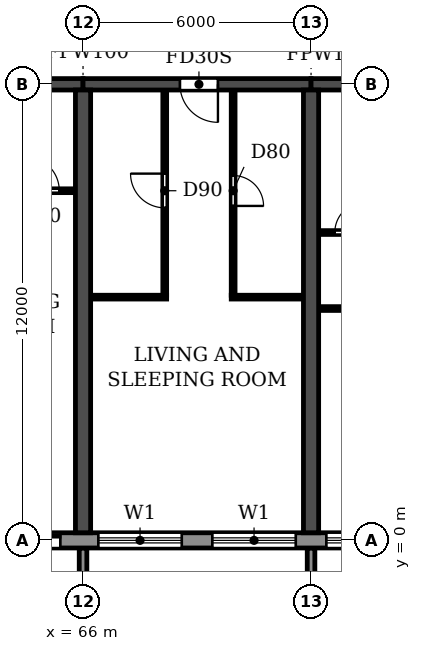
"""IFC4 building model, lengths in metres.
Left out: names, types, materials, properties, quantities, classifications, styles, units other than length and angle.
Written with IfcOpenShell. Run it as: python <this file> out.ifc"""

import sys

from ifc_helpers import new_model, si_unit, direction, frame, frame_2d, origin, place, context, subcontext, project, spatial, polyline, rectangle, outline, extrude, source, transform, mapped, element, fill, save


model = new_model("IFC4")
c1 = context("Model", 3, precision=1e-05, world=origin(), true_north=direction((0.0, 1.0)))
c2 = subcontext(c1, "Body", "Model", "MODEL_VIEW")
j1 = project(units=[si_unit("LENGTHUNIT", "METRE"), si_unit("PLANEANGLEUNIT", "RADIAN")], contexts=[c1])
p1 = place(None, origin())
s1 = spatial("IfcSite", under=j1, at=p1, CompositionType="ELEMENT")
p2 = place(p1, origin())
s2 = spatial("IfcBuilding", under=s1, at=p2, CompositionType="ELEMENT")
p3 = place(p2, frame((0.0, 0.0, 49.8)))
s3 = spatial("IfcBuildingStorey", under=s2, at=p3, CompositionType="ELEMENT", Elevation=49.8)
for number, where, z_axis, x_axis in (
    (1, (66.0, 0.2, 0.0), (0.0, 0.0, 1.0), (0.0, 1.0, 0.0)),
    (2, (72.0, 0.2, 0.0), (0.0, 0.0, 1.0), (0.0, 1.0, 0.0)),
):
    element("IfcWall", number, at=place(p3, frame(where, z_axis=z_axis, x_axis=x_axis)), inside=s3, PredefinedType="SHEAR", context=c2, shape_type="SweptSolid", body=[
        extrude(rectangle(XDim=11.65, YDim=0.4, at=frame_2d((5.825, 0.0))), origin(), (0.0, 0.0, 1.0), 3.0),
    ])
p4 = place(p3, frame((60.0, 12.0, 0.0), z_axis=(0.0, 0.0, 1.0), x_axis=(1.0, 0.0, 0.0)))
e3 = element("IfcWall", 3, at=p4, inside=s3, PredefinedType="SHEAR", context=c2, shape_type="SweptSolid", body=[
    extrude(rectangle(XDim=6.0, YDim=0.3, at=frame_2d((3.0, 0.0))), origin(), (0.0, 0.0, 1.0), 2.4),
])
p5 = place(p4, frame((2.45, 0.0, 0.0)))
e4 = element("IfcOpeningElement", 4, at=p5, cuts=e3, PredefinedType="OPENING", context=c2, shape_type="SweptSolid", body=[
    extrude(rectangle(XDim=1.0, YDim=2.1, at=frame_2d((0.5, 1.05))), frame((0.0, 0.16, 0.0), z_axis=(0.0, -1.0, 0.0), x_axis=(1.0, 0.0, 0.0)), (0.0, 0.0, 1.0), 0.32),
])
p6 = place(p3, frame((66.0, 12.0, 0.0), z_axis=(0.0, 0.0, 1.0), x_axis=(1.0, 0.0, 0.0)))
e5 = element("IfcWall", 5, at=p6, inside=s3, PredefinedType="SHEAR", context=c2, shape_type="SweptSolid", body=[
    extrude(rectangle(XDim=6.0, YDim=0.3, at=frame_2d((3.0, 0.0))), origin(), (0.0, 0.0, 1.0), 2.4),
])
p7 = place(p6, frame((2.55, 0.0, 0.0)))
e6 = element("IfcOpeningElement", 6, at=p7, cuts=e5, PredefinedType="OPENING", context=c2, shape_type="SweptSolid", body=[
    extrude(rectangle(XDim=1.0, YDim=2.1, at=frame_2d((0.5, 1.05))), frame((0.0, 0.16, 0.0), z_axis=(0.0, -1.0, 0.0), x_axis=(1.0, 0.0, 0.0)), (0.0, 0.0, 1.0), 0.32),
])
p8 = place(p3, frame((72.0, 12.0, 0.0), z_axis=(0.0, 0.0, 1.0), x_axis=(1.0, 0.0, 0.0)))
e7 = element("IfcWall", 7, at=p8, inside=s3, PredefinedType="SHEAR", context=c2, shape_type="SweptSolid", body=[
    extrude(rectangle(XDim=6.0, YDim=0.3, at=frame_2d((3.0, 0.0))), origin(), (0.0, 0.0, 1.0), 2.4),
])
p9 = place(p8, frame((2.45, 0.0, 0.0)))
e8 = element("IfcOpeningElement", 8, at=p9, cuts=e7, PredefinedType="OPENING", context=c2, shape_type="SweptSolid", body=[
    extrude(rectangle(XDim=1.0, YDim=2.1, at=frame_2d((0.5, 1.05))), frame((0.0, 0.16, 0.0), z_axis=(0.0, -1.0, 0.0), x_axis=(1.0, 0.0, 0.0)), (0.0, 0.0, 1.0), 0.32),
])
p10 = place(p3, frame((4.683, 0.0, 0.0), z_axis=(0.0, 0.0, 1.0), x_axis=(1.0, 0.0, 0.0)))
e9 = element("IfcWall", 9, at=p10, inside=s3, PredefinedType="STANDARD", context=c2, shape_type="SweptSolid", body=[
    extrude(rectangle(XDim=92.634, YDim=0.4, at=frame_2d((46.317, 0.0))), origin(), (0.0, 0.0, 1.0), 3.0),
])
p11 = place(p10, frame((1.717, 0.0, 0.9)))
e10 = element("IfcOpeningElement", 10, at=p11, cuts=e9, PredefinedType="OPENING", context=c2, shape_type="SweptSolid", body=[
    extrude(rectangle(XDim=2.2, YDim=1.5, at=frame_2d((1.1, 0.75))), frame((0.0, 0.21, 0.0), z_axis=(0.0, -1.0, 0.0), x_axis=(1.0, 0.0, 0.0)), (0.0, 0.0, 1.0), 0.42),
])
p12 = place(p10, frame((4.717, 0.0, 0.9)))
e11 = element("IfcOpeningElement", 11, at=p12, cuts=e9, PredefinedType="OPENING", context=c2, shape_type="SweptSolid", body=[
    extrude(rectangle(XDim=2.2, YDim=1.5, at=frame_2d((1.1, 0.75))), frame((0.0, 0.21, 0.0), z_axis=(0.0, -1.0, 0.0), x_axis=(1.0, 0.0, 0.0)), (0.0, 0.0, 1.0), 0.42),
])
p13 = place(p10, frame((7.717, 0.0, 0.9)))
e12 = element("IfcOpeningElement", 12, at=p13, cuts=e9, PredefinedType="OPENING", context=c2, shape_type="SweptSolid", body=[
    extrude(rectangle(XDim=2.2, YDim=1.5, at=frame_2d((1.1, 0.75))), frame((0.0, 0.21, 0.0), z_axis=(0.0, -1.0, 0.0), x_axis=(1.0, 0.0, 0.0)), (0.0, 0.0, 1.0), 0.42),
])
p14 = place(p10, frame((10.917, 0.0, 0.0)))
e13 = element("IfcOpeningElement", 13, at=p14, cuts=e9, PredefinedType="OPENING", context=c2, shape_type="SweptSolid", body=[
    extrude(rectangle(XDim=1.8, YDim=2.4, at=frame_2d((0.9, 1.2))), frame((0.0, 0.21, 0.0), z_axis=(0.0, -1.0, 0.0), x_axis=(1.0, 0.0, 0.0)), (0.0, 0.0, 1.0), 0.42),
])
p15 = place(p10, frame((13.717, 0.0, 0.9)))
e14 = element("IfcOpeningElement", 14, at=p15, cuts=e9, PredefinedType="OPENING", context=c2, shape_type="SweptSolid", body=[
    extrude(rectangle(XDim=2.2, YDim=1.5, at=frame_2d((1.1, 0.75))), frame((0.0, 0.21, 0.0), z_axis=(0.0, -1.0, 0.0), x_axis=(1.0, 0.0, 0.0)), (0.0, 0.0, 1.0), 0.42),
])
p16 = place(p10, frame((16.717, 0.0, 0.9)))
e15 = element("IfcOpeningElement", 15, at=p16, cuts=e9, PredefinedType="OPENING", context=c2, shape_type="SweptSolid", body=[
    extrude(rectangle(XDim=2.2, YDim=1.5, at=frame_2d((1.1, 0.75))), frame((0.0, 0.21, 0.0), z_axis=(0.0, -1.0, 0.0), x_axis=(1.0, 0.0, 0.0)), (0.0, 0.0, 1.0), 0.42),
])
p17 = place(p10, frame((19.917, 0.0, 0.0)))
e16 = element("IfcOpeningElement", 16, at=p17, cuts=e9, PredefinedType="OPENING", context=c2, shape_type="SweptSolid", body=[
    extrude(rectangle(XDim=1.8, YDim=2.4, at=frame_2d((0.9, 1.2))), frame((0.0, 0.21, 0.0), z_axis=(0.0, -1.0, 0.0), x_axis=(1.0, 0.0, 0.0)), (0.0, 0.0, 1.0), 0.42),
])
p18 = place(p10, frame((22.717, 0.0, 0.9)))
e17 = element("IfcOpeningElement", 17, at=p18, cuts=e9, PredefinedType="OPENING", context=c2, shape_type="SweptSolid", body=[
    extrude(rectangle(XDim=2.2, YDim=1.5, at=frame_2d((1.1, 0.75))), frame((0.0, 0.21, 0.0), z_axis=(0.0, -1.0, 0.0), x_axis=(1.0, 0.0, 0.0)), (0.0, 0.0, 1.0), 0.42),
])
p19 = place(p10, frame((25.717, 0.0, 0.9)))
e18 = element("IfcOpeningElement", 18, at=p19, cuts=e9, PredefinedType="OPENING", context=c2, shape_type="SweptSolid", body=[
    extrude(rectangle(XDim=2.2, YDim=1.5, at=frame_2d((1.1, 0.75))), frame((0.0, 0.21, 0.0), z_axis=(0.0, -1.0, 0.0), x_axis=(1.0, 0.0, 0.0)), (0.0, 0.0, 1.0), 0.42),
])
p20 = place(p10, frame((28.717, 0.0, 0.9)))
e19 = element("IfcOpeningElement", 19, at=p20, cuts=e9, PredefinedType="OPENING", context=c2, shape_type="SweptSolid", body=[
    extrude(rectangle(XDim=2.2, YDim=1.5, at=frame_2d((1.1, 0.75))), frame((0.0, 0.21, 0.0), z_axis=(0.0, -1.0, 0.0), x_axis=(1.0, 0.0, 0.0)), (0.0, 0.0, 1.0), 0.42),
])
p21 = place(p10, frame((31.717, 0.0, 0.9)))
e20 = element("IfcOpeningElement", 20, at=p21, cuts=e9, PredefinedType="OPENING", context=c2, shape_type="SweptSolid", body=[
    extrude(rectangle(XDim=2.2, YDim=1.5, at=frame_2d((1.1, 0.75))), frame((0.0, 0.21, 0.0), z_axis=(0.0, -1.0, 0.0), x_axis=(1.0, 0.0, 0.0)), (0.0, 0.0, 1.0), 0.42),
])
p22 = place(p10, frame((34.917, 0.0, 0.0)))
e21 = element("IfcOpeningElement", 21, at=p22, cuts=e9, PredefinedType="OPENING", context=c2, shape_type="SweptSolid", body=[
    extrude(rectangle(XDim=1.8, YDim=2.4, at=frame_2d((0.9, 1.2))), frame((0.0, 0.21, 0.0), z_axis=(0.0, -1.0, 0.0), x_axis=(1.0, 0.0, 0.0)), (0.0, 0.0, 1.0), 0.42),
])
p23 = place(p10, frame((37.717, 0.0, 0.9)))
e22 = element("IfcOpeningElement", 22, at=p23, cuts=e9, PredefinedType="OPENING", context=c2, shape_type="SweptSolid", body=[
    extrude(rectangle(XDim=2.2, YDim=1.5, at=frame_2d((1.1, 0.75))), frame((0.0, 0.21, 0.0), z_axis=(0.0, -1.0, 0.0), x_axis=(1.0, 0.0, 0.0)), (0.0, 0.0, 1.0), 0.42),
])
p24 = place(p10, frame((40.717, 0.0, 0.9)))
e23 = element("IfcOpeningElement", 23, at=p24, cuts=e9, PredefinedType="OPENING", context=c2, shape_type="SweptSolid", body=[
    extrude(rectangle(XDim=2.2, YDim=1.5, at=frame_2d((1.1, 0.75))), frame((0.0, 0.21, 0.0), z_axis=(0.0, -1.0, 0.0), x_axis=(1.0, 0.0, 0.0)), (0.0, 0.0, 1.0), 0.42),
])
p25 = place(p10, frame((43.717, 0.0, 0.9)))
e24 = element("IfcOpeningElement", 24, at=p25, cuts=e9, PredefinedType="OPENING", context=c2, shape_type="SweptSolid", body=[
    extrude(rectangle(XDim=2.2, YDim=1.5, at=frame_2d((1.1, 0.75))), frame((0.0, 0.21, 0.0), z_axis=(0.0, -1.0, 0.0), x_axis=(1.0, 0.0, 0.0)), (0.0, 0.0, 1.0), 0.42),
])
p26 = place(p10, frame((46.917, 0.0, 0.0)))
e25 = element("IfcOpeningElement", 25, at=p26, cuts=e9, PredefinedType="OPENING", context=c2, shape_type="SweptSolid", body=[
    extrude(rectangle(XDim=1.8, YDim=2.4, at=frame_2d((0.9, 1.2))), frame((0.0, 0.21, 0.0), z_axis=(0.0, -1.0, 0.0), x_axis=(1.0, 0.0, 0.0)), (0.0, 0.0, 1.0), 0.42),
])
p27 = place(p10, frame((49.717, 0.0, 0.9)))
e26 = element("IfcOpeningElement", 26, at=p27, cuts=e9, PredefinedType="OPENING", context=c2, shape_type="SweptSolid", body=[
    extrude(rectangle(XDim=2.2, YDim=1.5, at=frame_2d((1.1, 0.75))), frame((0.0, 0.21, 0.0), z_axis=(0.0, -1.0, 0.0), x_axis=(1.0, 0.0, 0.0)), (0.0, 0.0, 1.0), 0.42),
])
p28 = place(p10, frame((52.717, 0.0, 0.9)))
e27 = element("IfcOpeningElement", 27, at=p28, cuts=e9, PredefinedType="OPENING", context=c2, shape_type="SweptSolid", body=[
    extrude(rectangle(XDim=2.2, YDim=1.5, at=frame_2d((1.1, 0.75))), frame((0.0, 0.21, 0.0), z_axis=(0.0, -1.0, 0.0), x_axis=(1.0, 0.0, 0.0)), (0.0, 0.0, 1.0), 0.42),
])
p29 = place(p10, frame((55.717, 0.0, 0.9)))
e28 = element("IfcOpeningElement", 28, at=p29, cuts=e9, PredefinedType="OPENING", context=c2, shape_type="SweptSolid", body=[
    extrude(rectangle(XDim=2.2, YDim=1.5, at=frame_2d((1.1, 0.75))), frame((0.0, 0.21, 0.0), z_axis=(0.0, -1.0, 0.0), x_axis=(1.0, 0.0, 0.0)), (0.0, 0.0, 1.0), 0.42),
])
p30 = place(p10, frame((58.917, 0.0, 0.0)))
e29 = element("IfcOpeningElement", 29, at=p30, cuts=e9, PredefinedType="OPENING", context=c2, shape_type="SweptSolid", body=[
    extrude(rectangle(XDim=1.8, YDim=2.4, at=frame_2d((0.9, 1.2))), frame((0.0, 0.21, 0.0), z_axis=(0.0, -1.0, 0.0), x_axis=(1.0, 0.0, 0.0)), (0.0, 0.0, 1.0), 0.42),
])
p31 = place(p10, frame((61.717, 0.0, 0.9)))
e30 = element("IfcOpeningElement", 30, at=p31, cuts=e9, PredefinedType="OPENING", context=c2, shape_type="SweptSolid", body=[
    extrude(rectangle(XDim=2.2, YDim=1.5, at=frame_2d((1.1, 0.75))), frame((0.0, 0.21, 0.0), z_axis=(0.0, -1.0, 0.0), x_axis=(1.0, 0.0, 0.0)), (0.0, 0.0, 1.0), 0.42),
])
p32 = place(p10, frame((64.717, 0.0, 0.9)))
e31 = element("IfcOpeningElement", 31, at=p32, cuts=e9, PredefinedType="OPENING", context=c2, shape_type="SweptSolid", body=[
    extrude(rectangle(XDim=2.2, YDim=1.5, at=frame_2d((1.1, 0.75))), frame((0.0, 0.21, 0.0), z_axis=(0.0, -1.0, 0.0), x_axis=(1.0, 0.0, 0.0)), (0.0, 0.0, 1.0), 0.42),
])
p33 = place(p10, frame((67.717, 0.0, 0.9)))
e32 = element("IfcOpeningElement", 32, at=p33, cuts=e9, PredefinedType="OPENING", context=c2, shape_type="SweptSolid", body=[
    extrude(rectangle(XDim=2.2, YDim=1.5, at=frame_2d((1.1, 0.75))), frame((0.0, 0.21, 0.0), z_axis=(0.0, -1.0, 0.0), x_axis=(1.0, 0.0, 0.0)), (0.0, 0.0, 1.0), 0.42),
])
p34 = place(p10, frame((70.917, 0.0, 0.0)))
e33 = element("IfcOpeningElement", 33, at=p34, cuts=e9, PredefinedType="OPENING", context=c2, shape_type="SweptSolid", body=[
    extrude(rectangle(XDim=1.8, YDim=2.4, at=frame_2d((0.9, 1.2))), frame((0.0, 0.21, 0.0), z_axis=(0.0, -1.0, 0.0), x_axis=(1.0, 0.0, 0.0)), (0.0, 0.0, 1.0), 0.42),
])
p35 = place(p10, frame((73.717, 0.0, 0.9)))
e34 = element("IfcOpeningElement", 34, at=p35, cuts=e9, PredefinedType="OPENING", context=c2, shape_type="SweptSolid", body=[
    extrude(rectangle(XDim=2.2, YDim=1.5, at=frame_2d((1.1, 0.75))), frame((0.0, 0.21, 0.0), z_axis=(0.0, -1.0, 0.0), x_axis=(1.0, 0.0, 0.0)), (0.0, 0.0, 1.0), 0.42),
])
p36 = place(p10, frame((76.717, 0.0, 0.9)))
e35 = element("IfcOpeningElement", 35, at=p36, cuts=e9, PredefinedType="OPENING", context=c2, shape_type="SweptSolid", body=[
    extrude(rectangle(XDim=2.2, YDim=1.5, at=frame_2d((1.1, 0.75))), frame((0.0, 0.21, 0.0), z_axis=(0.0, -1.0, 0.0), x_axis=(1.0, 0.0, 0.0)), (0.0, 0.0, 1.0), 0.42),
])
p37 = place(p10, frame((79.717, 0.0, 0.9)))
e36 = element("IfcOpeningElement", 36, at=p37, cuts=e9, PredefinedType="OPENING", context=c2, shape_type="SweptSolid", body=[
    extrude(rectangle(XDim=2.2, YDim=1.5, at=frame_2d((1.1, 0.75))), frame((0.0, 0.21, 0.0), z_axis=(0.0, -1.0, 0.0), x_axis=(1.0, 0.0, 0.0)), (0.0, 0.0, 1.0), 0.42),
])
p38 = place(p10, frame((82.917, 0.0, 0.0)))
e37 = element("IfcOpeningElement", 37, at=p38, cuts=e9, PredefinedType="OPENING", context=c2, shape_type="SweptSolid", body=[
    extrude(rectangle(XDim=1.8, YDim=2.4, at=frame_2d((0.9, 1.2))), frame((0.0, 0.21, 0.0), z_axis=(0.0, -1.0, 0.0), x_axis=(1.0, 0.0, 0.0)), (0.0, 0.0, 1.0), 0.42),
])
p39 = place(p10, frame((85.717, 0.0, 0.9)))
e38 = element("IfcOpeningElement", 38, at=p39, cuts=e9, PredefinedType="OPENING", context=c2, shape_type="SweptSolid", body=[
    extrude(rectangle(XDim=2.2, YDim=1.5, at=frame_2d((1.1, 0.75))), frame((0.0, 0.21, 0.0), z_axis=(0.0, -1.0, 0.0), x_axis=(1.0, 0.0, 0.0)), (0.0, 0.0, 1.0), 0.42),
])
p40 = place(p10, frame((88.717, 0.0, 0.9)))
e39 = element("IfcOpeningElement", 39, at=p40, cuts=e9, PredefinedType="OPENING", context=c2, shape_type="SweptSolid", body=[
    extrude(rectangle(XDim=2.2, YDim=1.5, at=frame_2d((1.1, 0.75))), frame((0.0, 0.21, 0.0), z_axis=(0.0, -1.0, 0.0), x_axis=(1.0, 0.0, 0.0)), (0.0, 0.0, 1.0), 0.42),
])
m1 = source(origin(), c2, "Body", "SweptSolid", [
    extrude(outline(polyline([(0.0, 0.0), (0.2, 0.0), (0.2, 1.65), (0.0, 1.65), (0.0, 0.0)])), origin(), (0.0, 0.0, 1.0), 3.1),
])
for number, where in (
    (40, (65.9, -1.85, 0.0)),
    (41, (71.9, -1.85, 0.0)),
):
    element("IfcWall", number, at=place(p3, frame(where)), inside=s3, PredefinedType="STANDARD", context=c2, shape_type="MappedRepresentation", body=[
        mapped(m1, transform((0.0, 0.0, 0.0))),
    ])
p41 = place(p3, frame((72.21, 6.1, 0.0), z_axis=(0.0, 0.0, 1.0), x_axis=(1.0, 0.0, 0.0)))
e42 = element("IfcWall", 42, at=p41, inside=s3, PredefinedType="PARTITIONING", context=c2, shape_type="SweptSolid", body=[
    extrude(rectangle(XDim=2.84, YDim=0.1, at=frame_2d((1.42, 0.0))), origin(), (0.0, 0.0, 1.0), 3.0),
])
p42 = place(p41, frame((1.39, 0.0, 0.0)))
e43 = element("IfcOpeningElement", 43, at=p42, cuts=e42, PredefinedType="OPENING", context=c2, shape_type="SweptSolid", body=[
    extrude(rectangle(XDim=0.9, YDim=2.1, at=frame_2d((0.45, 1.05))), frame((0.0, 0.06, 0.0), z_axis=(0.0, -1.0, 0.0), x_axis=(1.0, 0.0, 0.0)), (0.0, 0.0, 1.0), 0.12),
])
p43 = place(p3, frame((66.21, 6.4, 0.0), z_axis=(0.0, 0.0, 1.0), x_axis=(1.0, 0.0, 0.0)))
e44 = element("IfcWall", 44, at=p43, inside=s3, PredefinedType="PARTITIONING", context=c2, shape_type="SweptSolid", body=[
    extrude(rectangle(XDim=1.99, YDim=0.1, at=frame_2d((0.995, 0.0))), origin(), (0.0, 0.0, 1.0), 3.0),
])
p44 = place(p3, frame((69.9, 6.4, 0.0), z_axis=(0.0, 0.0, 1.0), x_axis=(1.0, 0.0, 0.0)))
e45 = element("IfcWall", 45, at=p44, inside=s3, PredefinedType="PARTITIONING", context=c2, shape_type="SweptSolid", body=[
    extrude(rectangle(XDim=1.89, YDim=0.1, at=frame_2d((0.945, 0.0))), origin(), (0.0, 0.0, 1.0), 3.0),
])
p45 = place(p3, frame((72.21, 8.1, 0.0), z_axis=(0.0, 0.0, 1.0), x_axis=(1.0, 0.0, 0.0)))
e46 = element("IfcWall", 46, at=p45, inside=s3, PredefinedType="PARTITIONING", context=c2, shape_type="SweptSolid", body=[
    extrude(rectangle(XDim=1.89, YDim=0.1, at=frame_2d((0.945, 0.0))), origin(), (0.0, 0.0, 1.0), 3.0),
])
p46 = place(p45, frame((0.415, 0.0, 0.0)))
e47 = element("IfcOpeningElement", 47, at=p46, cuts=e46, PredefinedType="OPENING", context=c2, shape_type="SweptSolid", body=[
    extrude(rectangle(XDim=0.8, YDim=2.1, at=frame_2d((0.4, 1.05))), frame((0.0, 0.06, 0.0), z_axis=(0.0, -1.0, 0.0), x_axis=(1.0, 0.0, 0.0)), (0.0, 0.0, 1.0), 0.12),
])
p47 = place(p3, frame((63.8, 9.2, 0.0), z_axis=(0.0, 0.0, 1.0), x_axis=(1.0, 0.0, 0.0)))
e48 = element("IfcWall", 48, at=p47, inside=s3, PredefinedType="PARTITIONING", context=c2, shape_type="SweptSolid", body=[
    extrude(rectangle(XDim=1.99, YDim=0.1, at=frame_2d((0.995, 0.0))), origin(), (0.0, 0.0, 1.0), 3.0),
])
p48 = place(p47, frame((0.675, 0.0, 0.0)))
e49 = element("IfcOpeningElement", 49, at=p48, cuts=e48, PredefinedType="OPENING", context=c2, shape_type="SweptSolid", body=[
    extrude(rectangle(XDim=0.9, YDim=2.1, at=frame_2d((0.45, 1.05))), frame((0.0, 0.06, 0.0), z_axis=(0.0, -1.0, 0.0), x_axis=(1.0, 0.0, 0.0)), (0.0, 0.0, 1.0), 0.12),
])
p49 = place(p3, frame((68.15, 6.45, 0.0), z_axis=(0.0, 0.0, 1.0), x_axis=(0.0, 1.0, 0.0)))
e50 = element("IfcWall", 50, at=p49, inside=s3, PredefinedType="PARTITIONING", context=c2, shape_type="SweptSolid", body=[
    extrude(rectangle(XDim=5.39, YDim=0.1, at=frame_2d((2.695, 0.0))), origin(), (0.0, 0.0, 1.0), 3.0),
])
p50 = place(p49, frame((2.3, 0.0, 0.0)))
e51 = element("IfcOpeningElement", 51, at=p50, cuts=e50, PredefinedType="OPENING", context=c2, shape_type="SweptSolid", body=[
    extrude(rectangle(XDim=0.9, YDim=2.1, at=frame_2d((0.45, 1.05))), frame((0.0, 0.06, 0.0), z_axis=(0.0, -1.0, 0.0), x_axis=(1.0, 0.0, 0.0)), (0.0, 0.0, 1.0), 0.12),
])
p51 = place(p3, frame((69.95, 6.45, 0.0), z_axis=(0.0, 0.0, 1.0), x_axis=(0.0, 1.0, 0.0)))
e52 = element("IfcWall", 52, at=p51, inside=s3, PredefinedType="PARTITIONING", context=c2, shape_type="SweptSolid", body=[
    extrude(rectangle(XDim=5.39, YDim=0.1, at=frame_2d((2.695, 0.0))), origin(), (0.0, 0.0, 1.0), 3.0),
])
p52 = place(p51, frame((2.35, 0.0, 0.0)))
e53 = element("IfcOpeningElement", 53, at=p52, cuts=e52, PredefinedType="OPENING", context=c2, shape_type="SweptSolid", body=[
    extrude(rectangle(XDim=0.8, YDim=2.1, at=frame_2d((0.4, 1.05))), frame((0.0, 0.06, 0.0), z_axis=(0.0, -1.0, 0.0), x_axis=(1.0, 0.0, 0.0)), (0.0, 0.0, 1.0), 0.12),
])
p53 = place(p30, origin())
e54 = element("IfcDoor", 54, at=p53, inside=s3, OperationType="DOUBLE_DOOR_SLIDING", PredefinedType="DOOR", context=c2, shape_type="SweptSolid", body=[
    extrude(rectangle(XDim=1.8, YDim=2.4, at=frame_2d((0.9, 1.2))), frame((0.0, 0.025, 0.0), z_axis=(0.0, -1.0, 0.0), x_axis=(1.0, 0.0, 0.0)), (0.0, 0.0, 1.0), 0.05),
])
fill(e29, e54)
p54 = place(p31, origin())
e55 = element("IfcWindow", 55, at=p54, inside=s3, PartitioningType="DOUBLE_PANEL_HORIZONTAL", PredefinedType="WINDOW", context=c2, shape_type="SweptSolid", body=[
    extrude(rectangle(XDim=2.2, YDim=1.5, at=frame_2d((1.1, 0.75))), frame((0.0, 0.03, 0.0), z_axis=(0.0, -1.0, 0.0), x_axis=(1.0, 0.0, 0.0)), (0.0, 0.0, 1.0), 0.06),
])
fill(e30, e55)
p55 = place(p32, origin())
e56 = element("IfcWindow", 56, at=p55, inside=s3, PartitioningType="DOUBLE_PANEL_HORIZONTAL", PredefinedType="WINDOW", context=c2, shape_type="SweptSolid", body=[
    extrude(rectangle(XDim=2.2, YDim=1.5, at=frame_2d((1.1, 0.75))), frame((0.0, 0.03, 0.0), z_axis=(0.0, -1.0, 0.0), x_axis=(1.0, 0.0, 0.0)), (0.0, 0.0, 1.0), 0.06),
])
fill(e31, e56)
p56 = place(p33, origin())
e57 = element("IfcWindow", 57, at=p56, inside=s3, PartitioningType="DOUBLE_PANEL_HORIZONTAL", PredefinedType="WINDOW", context=c2, shape_type="SweptSolid", body=[
    extrude(rectangle(XDim=2.2, YDim=1.5, at=frame_2d((1.1, 0.75))), frame((0.0, 0.03, 0.0), z_axis=(0.0, -1.0, 0.0), x_axis=(1.0, 0.0, 0.0)), (0.0, 0.0, 1.0), 0.06),
])
fill(e32, e57)
p57 = place(p48, origin())
e58 = element("IfcDoor", 58, at=p57, inside=s3, OperationType="SINGLE_SWING_LEFT", PredefinedType="DOOR", context=c2, shape_type="SweptSolid", body=[
    extrude(rectangle(XDim=0.9, YDim=2.1, at=frame_2d((0.45, 1.05))), frame((0.0, 0.025, 0.0), z_axis=(0.0, -1.0, 0.0), x_axis=(1.0, 0.0, 0.0)), (0.0, 0.0, 1.0), 0.05),
])
fill(e49, e58)
p58 = place(p50, origin())
e59 = element("IfcDoor", 59, at=p58, inside=s3, OperationType="SINGLE_SWING_RIGHT", PredefinedType="DOOR", context=c2, shape_type="SweptSolid", body=[
    extrude(rectangle(XDim=0.9, YDim=2.1, at=frame_2d((0.45, 1.05))), frame((0.0, 0.025, 0.0), z_axis=(0.0, -1.0, 0.0), x_axis=(1.0, 0.0, 0.0)), (0.0, 0.0, 1.0), 0.05),
])
fill(e51, e59)
p59 = place(p7, frame((1.0, 0.0, 0.0), z_axis=(0.0, 0.0, 1.0), x_axis=(-1.0, 0.0, 0.0)))
e60 = element("IfcDoor", 60, at=p59, inside=s3, OperationType="SINGLE_SWING_LEFT", PredefinedType="DOOR", context=c2, shape_type="SweptSolid", body=[
    extrude(rectangle(XDim=1.0, YDim=2.1, at=frame_2d((0.5, 1.05))), frame((0.0, 0.025, 0.0), z_axis=(0.0, -1.0, 0.0), x_axis=(1.0, 0.0, 0.0)), (0.0, 0.0, 1.0), 0.05),
])
fill(e6, e60)
p60 = place(p52, frame((0.8, 0.0, 0.0), z_axis=(0.0, 0.0, 1.0), x_axis=(-1.0, 0.0, 0.0)))
e61 = element("IfcDoor", 61, at=p60, inside=s3, OperationType="SINGLE_SWING_RIGHT", PredefinedType="DOOR", context=c2, shape_type="SweptSolid", body=[
    extrude(rectangle(XDim=0.8, YDim=2.1, at=frame_2d((0.4, 1.05))), frame((0.0, 0.025, 0.0), z_axis=(0.0, -1.0, 0.0), x_axis=(1.0, 0.0, 0.0)), (0.0, 0.0, 1.0), 0.05),
])
fill(e53, e61)
p61 = place(p46, origin())
e62 = element("IfcDoor", 62, at=p61, inside=s3, OperationType="SINGLE_SWING_RIGHT", PredefinedType="DOOR", context=c2, shape_type="SweptSolid", body=[
    extrude(rectangle(XDim=0.8, YDim=2.1, at=frame_2d((0.4, 1.05))), frame((0.0, 0.025, 0.0), z_axis=(0.0, -1.0, 0.0), x_axis=(1.0, 0.0, 0.0)), (0.0, 0.0, 1.0), 0.05),
])
fill(e47, e62)
save(model, sys.argv[1])
